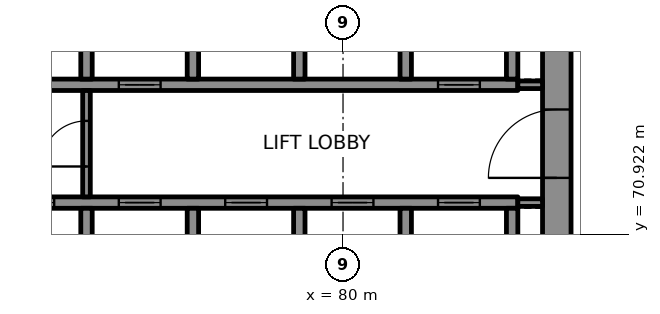
"""IFC4 building model, lengths in metres.
Left out: names, types, materials, properties, quantities, classifications, styles, units other than length and angle.
Written with IfcOpenShell. Run it as: python <this file> out.ifc"""

import sys

from ifc_helpers import new_model, si_unit, direction, frame, frame_2d, origin, place, context, subcontext, project, spatial, rectangle, extrude, element, fill, save


model = new_model("IFC4")
c1 = context("Model", 3, precision=1e-05, world=origin(), true_north=direction((0.0, 1.0)))
c2 = subcontext(c1, "Body", "Model", "MODEL_VIEW")
j1 = project(units=[si_unit("LENGTHUNIT", "METRE"), si_unit("PLANEANGLEUNIT", "RADIAN")], contexts=[c1])
p1 = place(None, origin())
s1 = spatial("IfcSite", under=j1, at=p1, CompositionType="ELEMENT")
p2 = place(p1, origin())
s2 = spatial("IfcBuilding", under=s1, at=p2, CompositionType="ELEMENT")
p3 = place(p2, frame((0.0, 0.0, 198.7)))
s3 = spatial("IfcBuildingStorey", under=s2, at=p3, CompositionType="ELEMENT", Elevation=198.7)
p4 = place(p3, frame((85.625, 67.75, 0.0), z_axis=(0.0, 0.0, 1.0), x_axis=(0.0, 1.0, 0.0)))
e1 = element("IfcWall", 1, at=p4, inside=s3, PredefinedType="SHEAR", context=c2, shape_type="SweptSolid", body=[
    extrude(rectangle(XDim=14.5, YDim=0.75, at=frame_2d((7.25, 0.0))), origin(), (0.0, 0.0, 1.0), 3.7),
])
p5 = place(p4, frame((4.65, 0.0, 0.0)))
e2 = element("IfcOpeningElement", 2, at=p5, cuts=e1, PredefinedType="OPENING", context=c2, shape_type="SweptSolid", body=[
    extrude(rectangle(XDim=1.8, YDim=2.1, at=frame_2d((0.9, 1.05))), frame((0.0, 0.385, 0.0), z_axis=(0.0, -1.0, 0.0), x_axis=(1.0, 0.0, 0.0)), (0.0, 0.0, 1.0), 0.77),
])
p6 = place(p4, frame((11.8, 0.0, 0.0)))
e3 = element("IfcOpeningElement", 3, at=p6, cuts=e1, PredefinedType="OPENING", context=c2, shape_type="SweptSolid", body=[
    extrude(rectangle(XDim=0.9, YDim=2.1, at=frame_2d((0.45, 1.05))), frame((0.0, 0.385, 0.0), z_axis=(0.0, -1.0, 0.0), x_axis=(1.0, 0.0, 0.0)), (0.0, 0.0, 1.0), 0.77),
])
p7 = place(p3, frame((70.3, 71.75, 0.0), z_axis=(0.0, 0.0, 1.0), x_axis=(1.0, 0.0, 0.0)))
e4 = element("IfcWall", 4, at=p7, inside=s3, PredefinedType="SHEAR", context=c2, shape_type="SweptSolid", body=[
    extrude(rectangle(XDim=14.3, YDim=0.3, at=frame_2d((7.15, 0.0))), origin(), (0.0, 0.0, 1.0), 3.7),
])
p8 = place(p7, frame((1.0, 0.0, 0.0)))
e5 = element("IfcOpeningElement", 5, at=p8, cuts=e4, PredefinedType="OPENING", context=c2, shape_type="SweptSolid", body=[
    extrude(rectangle(XDim=1.1, YDim=2.1, at=frame_2d((0.55, 1.05))), frame((0.0, 0.16, 0.0), z_axis=(0.0, -1.0, 0.0), x_axis=(1.0, 0.0, 0.0)), (0.0, 0.0, 1.0), 0.32),
])
p9 = place(p7, frame((3.8, 0.0, 0.0)))
e6 = element("IfcOpeningElement", 6, at=p9, cuts=e4, PredefinedType="OPENING", context=c2, shape_type="SweptSolid", body=[
    extrude(rectangle(XDim=1.1, YDim=2.1, at=frame_2d((0.55, 1.05))), frame((0.0, 0.16, 0.0), z_axis=(0.0, -1.0, 0.0), x_axis=(1.0, 0.0, 0.0)), (0.0, 0.0, 1.0), 0.32),
])
p10 = place(p7, frame((6.6, 0.0, 0.0)))
e7 = element("IfcOpeningElement", 7, at=p10, cuts=e4, PredefinedType="OPENING", context=c2, shape_type="SweptSolid", body=[
    extrude(rectangle(XDim=1.1, YDim=2.1, at=frame_2d((0.55, 1.05))), frame((0.0, 0.16, 0.0), z_axis=(0.0, -1.0, 0.0), x_axis=(1.0, 0.0, 0.0)), (0.0, 0.0, 1.0), 0.32),
])
p11 = place(p7, frame((9.4, 0.0, 0.0)))
e8 = element("IfcOpeningElement", 8, at=p11, cuts=e4, PredefinedType="OPENING", context=c2, shape_type="SweptSolid", body=[
    extrude(rectangle(XDim=1.1, YDim=2.1, at=frame_2d((0.55, 1.05))), frame((0.0, 0.16, 0.0), z_axis=(0.0, -1.0, 0.0), x_axis=(1.0, 0.0, 0.0)), (0.0, 0.0, 1.0), 0.32),
])
p12 = place(p7, frame((12.2, 0.0, 0.0)))
e9 = element("IfcOpeningElement", 9, at=p12, cuts=e4, PredefinedType="OPENING", context=c2, shape_type="SweptSolid", body=[
    extrude(rectangle(XDim=1.1, YDim=2.1, at=frame_2d((0.55, 1.05))), frame((0.0, 0.16, 0.0), z_axis=(0.0, -1.0, 0.0), x_axis=(1.0, 0.0, 0.0)), (0.0, 0.0, 1.0), 0.32),
])
p13 = place(p3, frame((70.3, 74.85, 0.0), z_axis=(0.0, 0.0, 1.0), x_axis=(1.0, 0.0, 0.0)))
e10 = element("IfcWall", 10, at=p13, inside=s3, PredefinedType="SHEAR", context=c2, shape_type="SweptSolid", body=[
    extrude(rectangle(XDim=14.3, YDim=0.3, at=frame_2d((7.15, 0.0))), origin(), (0.0, 0.0, 1.0), 3.7),
])
p14 = place(p13, frame((3.8, 0.0, 0.0)))
e11 = element("IfcOpeningElement", 11, at=p14, cuts=e10, PredefinedType="OPENING", context=c2, shape_type="SweptSolid", body=[
    extrude(rectangle(XDim=1.1, YDim=2.1, at=frame_2d((0.55, 1.05))), frame((0.0, 0.16, 0.0), z_axis=(0.0, -1.0, 0.0), x_axis=(1.0, 0.0, 0.0)), (0.0, 0.0, 1.0), 0.32),
])
p15 = place(p13, frame((12.2, 0.0, 0.0)))
e12 = element("IfcOpeningElement", 12, at=p15, cuts=e10, PredefinedType="OPENING", context=c2, shape_type="SweptSolid", body=[
    extrude(rectangle(XDim=1.1, YDim=2.1, at=frame_2d((0.55, 1.05))), frame((0.0, 0.16, 0.0), z_axis=(0.0, -1.0, 0.0), x_axis=(1.0, 0.0, 0.0)), (0.0, 0.0, 1.0), 0.32),
])
for number, where, z_axis, x_axis in (
    (13, (73.25, 69.0, 0.0), (0.0, 0.0, 1.0), (0.0, 1.0, 0.0)),
    (14, (73.25, 75.0, 0.0), (0.0, 0.0, 1.0), (0.0, 1.0, 0.0)),
    (15, (76.05, 69.0, 0.0), (0.0, 0.0, 1.0), (0.0, 1.0, 0.0)),
    (16, (76.05, 75.0, 0.0), (0.0, 0.0, 1.0), (0.0, 1.0, 0.0)),
    (17, (78.85, 69.0, 0.0), (0.0, 0.0, 1.0), (0.0, 1.0, 0.0)),
    (18, (78.85, 75.0, 0.0), (0.0, 0.0, 1.0), (0.0, 1.0, 0.0)),
    (19, (81.65, 69.0, 0.0), (0.0, 0.0, 1.0), (0.0, 1.0, 0.0)),
    (20, (81.65, 75.0, 0.0), (0.0, 0.0, 1.0), (0.0, 1.0, 0.0)),
    (21, (84.45, 69.0, 0.0), (0.0, 0.0, 1.0), (0.0, 1.0, 0.0)),
    (22, (84.45, 75.0, 0.0), (0.0, 0.0, 1.0), (0.0, 1.0, 0.0)),
):
    element("IfcWall", number, at=place(p3, frame(where, z_axis=z_axis, x_axis=x_axis)), inside=s3, PredefinedType="SHEAR", context=c2, shape_type="SweptSolid", body=[
        extrude(rectangle(XDim=2.6, YDim=0.3, at=frame_2d((1.3, 0.0))), origin(), (0.0, 0.0, 1.0), 3.7),
    ])
for number, where, z_axis, x_axis in (
    (23, (84.6, 71.75, 0.0), (0.0, 0.0, 1.0), (1.0, 0.0, 0.0)),
    (24, (84.6, 74.85, 0.0), (0.0, 0.0, 1.0), (1.0, 0.0, 0.0)),
):
    element("IfcWall", number, at=place(p3, frame(where, z_axis=z_axis, x_axis=x_axis)), inside=s3, PredefinedType="PARTITIONING", context=c2, shape_type="SweptSolid", body=[
        extrude(rectangle(XDim=0.65, YDim=0.2, at=frame_2d((0.325, 0.0))), origin(), (0.0, 0.0, 1.0), 3.7),
    ])
p16 = place(p3, frame((73.25, 71.9, 0.0), z_axis=(0.0, 0.0, 1.0), x_axis=(0.0, 1.0, 0.0)))
e25 = element("IfcWall", 25, at=p16, inside=s3, PredefinedType="PARTITIONING", context=c2, shape_type="SweptSolid", body=[
    extrude(rectangle(XDim=2.8, YDim=0.2, at=frame_2d((1.4, 0.0))), origin(), (0.0, 0.0, 1.0), 3.7),
])
p17 = place(p16, frame((0.8, 0.0, 0.0)))
e26 = element("IfcOpeningElement", 26, at=p17, cuts=e25, PredefinedType="OPENING", context=c2, shape_type="SweptSolid", body=[
    extrude(rectangle(XDim=1.2, YDim=2.1, at=frame_2d((0.6, 1.05))), frame((0.0, 0.11, 0.0), z_axis=(0.0, -1.0, 0.0), x_axis=(1.0, 0.0, 0.0)), (0.0, 0.0, 1.0), 0.22),
])
p18 = place(p8, origin())
e27 = element("IfcDoor", 27, at=p18, inside=s3, OperationType="DOUBLE_DOOR_SLIDING", PredefinedType="DOOR", context=c2, shape_type="SweptSolid", body=[
    extrude(rectangle(XDim=1.1, YDim=2.1, at=frame_2d((0.55, 1.05))), frame((0.0, 0.025, 0.0), z_axis=(0.0, -1.0, 0.0), x_axis=(1.0, 0.0, 0.0)), (0.0, 0.0, 1.0), 0.05),
])
fill(e5, e27)
p19 = place(p9, origin())
e28 = element("IfcDoor", 28, at=p19, inside=s3, OperationType="DOUBLE_DOOR_SLIDING", PredefinedType="DOOR", context=c2, shape_type="SweptSolid", body=[
    extrude(rectangle(XDim=1.1, YDim=2.1, at=frame_2d((0.55, 1.05))), frame((0.0, 0.025, 0.0), z_axis=(0.0, -1.0, 0.0), x_axis=(1.0, 0.0, 0.0)), (0.0, 0.0, 1.0), 0.05),
])
fill(e6, e28)
p20 = place(p10, origin())
e29 = element("IfcDoor", 29, at=p20, inside=s3, OperationType="DOUBLE_DOOR_SLIDING", PredefinedType="DOOR", context=c2, shape_type="SweptSolid", body=[
    extrude(rectangle(XDim=1.1, YDim=2.1, at=frame_2d((0.55, 1.05))), frame((0.0, 0.025, 0.0), z_axis=(0.0, -1.0, 0.0), x_axis=(1.0, 0.0, 0.0)), (0.0, 0.0, 1.0), 0.05),
])
fill(e7, e29)
p21 = place(p11, origin())
e30 = element("IfcDoor", 30, at=p21, inside=s3, OperationType="DOUBLE_DOOR_SLIDING", PredefinedType="DOOR", context=c2, shape_type="SweptSolid", body=[
    extrude(rectangle(XDim=1.1, YDim=2.1, at=frame_2d((0.55, 1.05))), frame((0.0, 0.025, 0.0), z_axis=(0.0, -1.0, 0.0), x_axis=(1.0, 0.0, 0.0)), (0.0, 0.0, 1.0), 0.05),
])
fill(e8, e30)
p22 = place(p12, origin())
e31 = element("IfcDoor", 31, at=p22, inside=s3, OperationType="DOUBLE_DOOR_SLIDING", PredefinedType="DOOR", context=c2, shape_type="SweptSolid", body=[
    extrude(rectangle(XDim=1.1, YDim=2.1, at=frame_2d((0.55, 1.05))), frame((0.0, 0.025, 0.0), z_axis=(0.0, -1.0, 0.0), x_axis=(1.0, 0.0, 0.0)), (0.0, 0.0, 1.0), 0.05),
])
fill(e9, e31)
p23 = place(p14, origin())
e32 = element("IfcDoor", 32, at=p23, inside=s3, OperationType="DOUBLE_DOOR_SLIDING", PredefinedType="DOOR", context=c2, shape_type="SweptSolid", body=[
    extrude(rectangle(XDim=1.1, YDim=2.1, at=frame_2d((0.55, 1.05))), frame((0.0, 0.025, 0.0), z_axis=(0.0, -1.0, 0.0), x_axis=(1.0, 0.0, 0.0)), (0.0, 0.0, 1.0), 0.05),
])
fill(e11, e32)
p24 = place(p15, origin())
e33 = element("IfcDoor", 33, at=p24, inside=s3, OperationType="DOUBLE_DOOR_SLIDING", PredefinedType="DOOR", context=c2, shape_type="SweptSolid", body=[
    extrude(rectangle(XDim=1.1, YDim=2.1, at=frame_2d((0.55, 1.05))), frame((0.0, 0.025, 0.0), z_axis=(0.0, -1.0, 0.0), x_axis=(1.0, 0.0, 0.0)), (0.0, 0.0, 1.0), 0.05),
])
fill(e12, e33)
p25 = place(p17, origin())
e34 = element("IfcDoor", 34, at=p25, inside=s3, OperationType="SINGLE_SWING_LEFT", PredefinedType="DOOR", context=c2, shape_type="SweptSolid", body=[
    extrude(rectangle(XDim=1.2, YDim=2.1, at=frame_2d((0.6, 1.05))), frame((0.0, 0.025, 0.0), z_axis=(0.0, -1.0, 0.0), x_axis=(1.0, 0.0, 0.0)), (0.0, 0.0, 1.0), 0.05),
])
fill(e26, e34)
p26 = place(p5, origin())
e35 = element("IfcDoor", 35, at=p26, inside=s3, OperationType="SINGLE_SWING_RIGHT", PredefinedType="DOOR", context=c2, shape_type="SweptSolid", body=[
    extrude(rectangle(XDim=1.8, YDim=2.1, at=frame_2d((0.9, 1.05))), frame((0.0, 0.095, 0.0), z_axis=(0.0, -1.0, 0.0), x_axis=(1.0, 0.0, 0.0)), (0.0, 0.0, 1.0), 0.19),
])
fill(e2, e35)
save(model, sys.argv[1])
